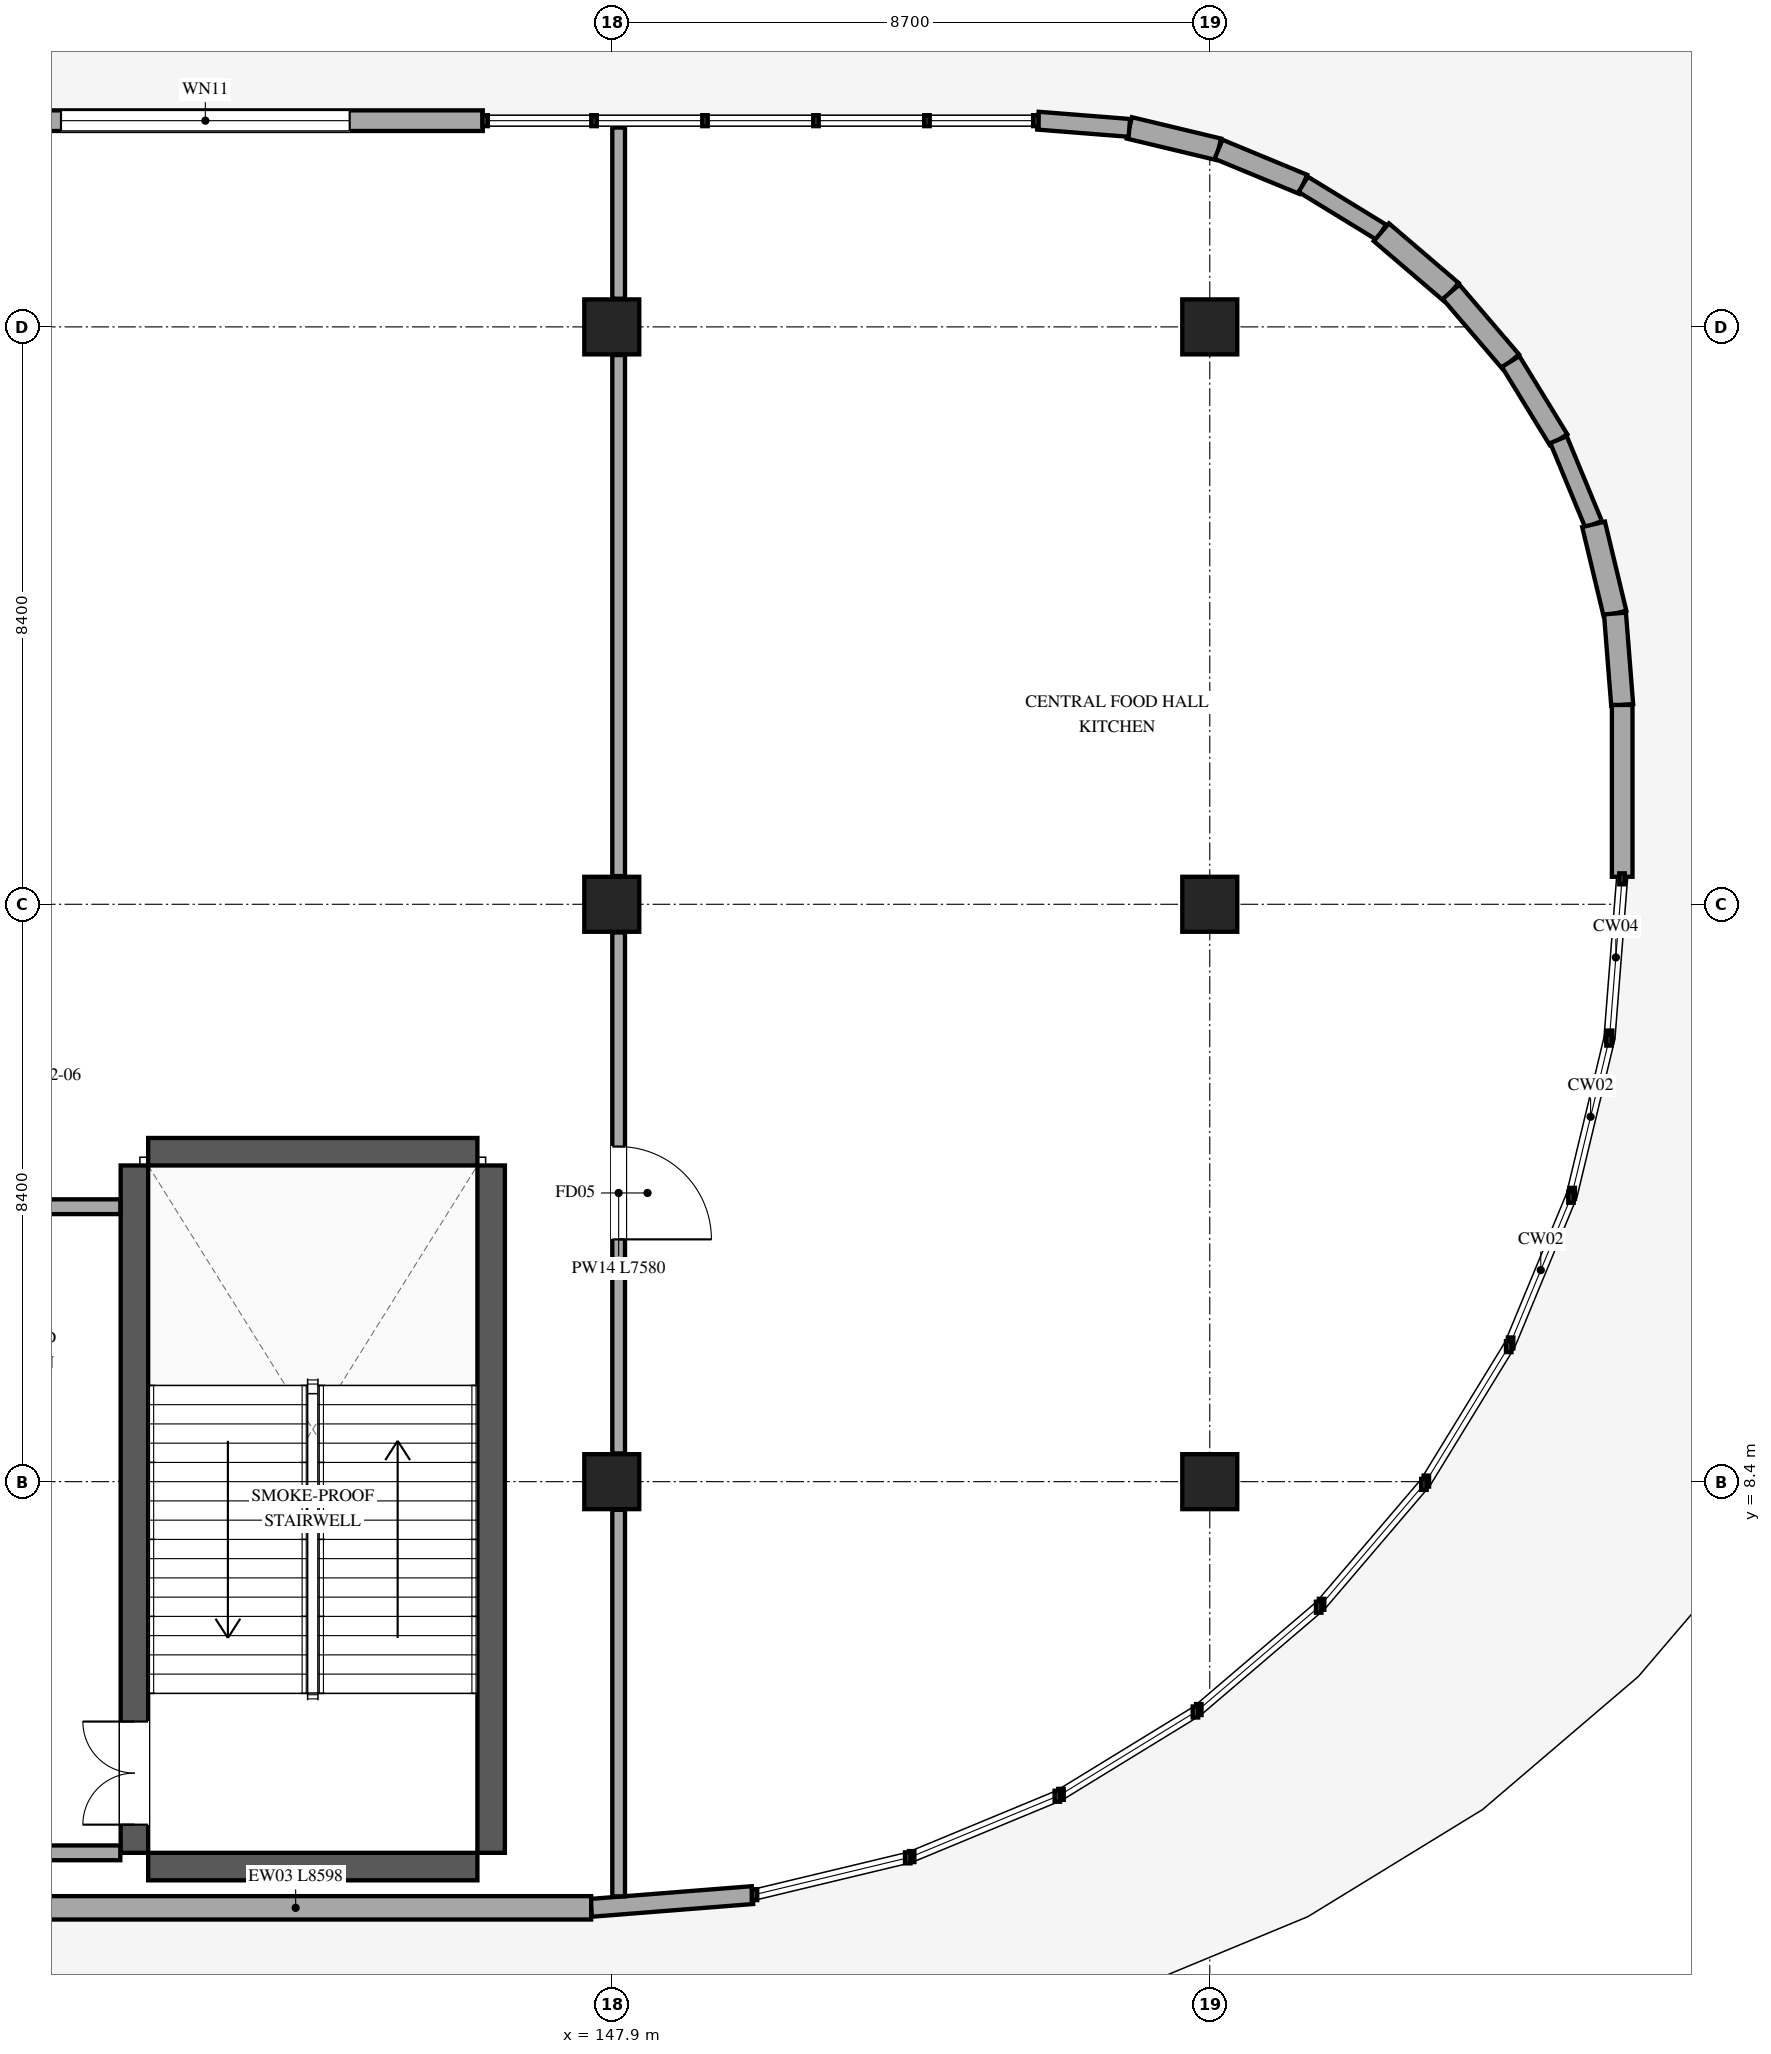
"""IFC4 building model, lengths in metres.
Left out: names, types, materials, properties, quantities, classifications, styles, units other than length and angle.
Written with IfcOpenShell. Run it as: python <this file> out.ifc"""

import sys

from ifc_helpers import new_model, si_unit, direction, frame, frame_2d, origin, origin_2d, place, context, subcontext, project, spatial, rectangle, extrude, element, fill, save


model = new_model("IFC4")
c1 = context("Model", 3, precision=1e-05, world=origin(), true_north=direction((0.0, 1.0)))
c2 = subcontext(c1, "Body", "Model", "MODEL_VIEW")
j1 = project(units=[si_unit("LENGTHUNIT", "METRE"), si_unit("PLANEANGLEUNIT", "RADIAN")], contexts=[c1])
p1 = place(None, origin())
s1 = spatial("IfcSite", under=j1, at=p1, CompositionType="ELEMENT")
p2 = place(p1, origin())
s2 = spatial("IfcBuilding", under=s1, at=p2, CompositionType="ELEMENT")
p3 = place(p2, frame((0.0, 0.0, 16.5)))
s3 = spatial("IfcBuildingStorey", under=s2, at=p3, CompositionType="ELEMENT", Elevation=16.5)
for number, where, z_axis, x_axis in (
    (1, (147.9, 8.4, 0.0), (0.0, 0.0, 1.0), (1.0, 0.0, 0.0)),
    (2, (147.9, 16.8, 0.0), (0.0, 0.0, 1.0), (1.0, 0.0, 0.0)),
    (3, (147.9, 25.2, 0.0), (0.0, 0.0, 1.0), (1.0, 0.0, 0.0)),
    (4, (156.6, 8.4, 0.0), (0.0, 0.0, 1.0), (1.0, 0.0, 0.0)),
    (5, (156.6, 16.8, 0.0), (0.0, 0.0, 1.0), (1.0, 0.0, 0.0)),
    (6, (156.6, 25.2, 0.0), (0.0, 0.0, 1.0), (1.0, 0.0, 0.0)),
):
    element("IfcColumn", number, at=place(p3, frame(where, z_axis=z_axis, x_axis=x_axis)), inside=s3, PredefinedType="COLUMN", context=c2, shape_type="SweptSolid", body=[
        extrude(rectangle(XDim=0.8, YDim=0.8, at=origin_2d()), origin(), (0.0, 0.0, 1.0), 5.1),
    ])
p4 = place(p3, frame((155.43, 28.095, 0.0), z_axis=(0.0, 0.0, 1.0), x_axis=(0.972433801414, -0.233179119707, 0.0)))
e7 = element("IfcWall", 7, at=p4, inside=s3, PredefinedType="STANDARD", context=c2, shape_type="SweptSolid", body=[
    extrude(rectangle(XDim=1.334, YDim=0.32, at=frame_2d((0.667, 0.0))), origin(), (0.0, 0.0, 1.0), 4.79),
])
p5 = place(p3, frame((156.727, 27.784, 0.0), z_axis=(0.0, 0.0, 1.0), x_axis=(0.923952127992, -0.382508124331, 0.0)))
e8 = element("IfcWall", 8, at=p5, inside=s3, PredefinedType="STANDARD", context=c2, shape_type="SweptSolid", body=[
    extrude(rectangle(XDim=1.333, YDim=0.3, at=frame_2d((0.667, 0.0))), origin(), (0.0, 0.0, 1.0), 4.79),
])
p6 = place(p3, frame((157.959, 27.274, 0.0), z_axis=(0.0, 0.0, 1.0), x_axis=(0.852543363643, -0.522656496285, 0.0)))
e9 = element("IfcWall", 9, at=p6, inside=s3, PredefinedType="STANDARD", context=c2, shape_type="SweptSolid", body=[
    extrude(rectangle(XDim=1.333, YDim=0.26, at=frame_2d((0.667, 0.0))), origin(), (0.0, 0.0, 1.0), 4.79),
])
p7 = place(p3, frame((159.096, 26.577, 0.0), z_axis=(0.0, 0.0, 1.0), x_axis=(0.760121344352, -0.649781149204, 0.0)))
e10 = element("IfcWall", 10, at=p7, inside=s3, PredefinedType="STANDARD", context=c2, shape_type="SweptSolid", body=[
    extrude(rectangle(XDim=1.334, YDim=0.34, at=frame_2d((0.667, 0.0))), origin(), (0.0, 0.0, 1.0), 4.79),
])
p8 = place(p3, frame((160.11, 25.71, 0.0), z_axis=(0.0, 0.0, 1.0), x_axis=(0.649871535961, -0.760044068951, 0.0)))
e11 = element("IfcWall", 11, at=p8, inside=s3, PredefinedType="STANDARD", context=c2, shape_type="SweptSolid", body=[
    extrude(rectangle(XDim=1.334, YDim=0.32, at=frame_2d((0.667, 0.0))), origin(), (0.0, 0.0, 1.0), 4.79),
])
p9 = place(p3, frame((160.977, 24.696, 0.0), z_axis=(0.0, 0.0, 1.0), x_axis=(0.522656496285, -0.852543363643, 0.0)))
e12 = element("IfcWall", 12, at=p9, inside=s3, PredefinedType="STANDARD", context=c2, shape_type="SweptSolid", body=[
    extrude(rectangle(XDim=1.333, YDim=0.3, at=frame_2d((0.667, 0.0))), origin(), (0.0, 0.0, 1.0), 4.79),
])
p10 = place(p3, frame((161.674, 23.559, 0.0), z_axis=(0.0, 0.0, 1.0), x_axis=(0.382443421217, -0.923978911863, 0.0)))
e13 = element("IfcWall", 13, at=p10, inside=s3, PredefinedType="STANDARD", context=c2, shape_type="SweptSolid", body=[
    extrude(rectangle(XDim=1.333, YDim=0.26, at=frame_2d((0.667, 0.0))), origin(), (0.0, 0.0, 1.0), 4.79),
])
p11 = place(p3, frame((162.184, 22.327, 0.0), z_axis=(0.0, 0.0, 1.0), x_axis=(0.233220628969, -0.972423847005, 0.0)))
e14 = element("IfcWall", 14, at=p11, inside=s3, PredefinedType="STANDARD", context=c2, shape_type="SweptSolid", body=[
    extrude(rectangle(XDim=1.334, YDim=0.34, at=frame_2d((0.667, 0.0))), origin(), (0.0, 0.0, 1.0), 4.79),
])
p12 = place(p3, frame((162.495, 21.03, 0.0), z_axis=(0.0, 0.0, 1.0), x_axis=(0.078683343185, -0.996899659698, 0.0)))
e15 = element("IfcWall", 15, at=p12, inside=s3, PredefinedType="STANDARD", context=c2, shape_type="SweptSolid", body=[
    extrude(rectangle(XDim=1.334, YDim=0.32, at=frame_2d((0.667, 0.0))), origin(), (0.0, 0.0, 1.0), 4.79),
])
p13 = place(p3, frame((162.6, 19.7, 0.0), z_axis=(0.0, 0.0, 1.0), x_axis=(0.0, -1.0, 0.0)))
e16 = element("IfcWall", 16, at=p13, inside=s3, PredefinedType="STANDARD", context=c2, shape_type="SweptSolid", body=[
    extrude(rectangle(XDim=2.5, YDim=0.3, at=frame_2d((1.25, 0.0))), origin(), (0.0, 0.0, 1.0), 4.79),
])
p14 = place(p3, frame((149.947, 2.385, 0.0), z_axis=(0.0, 0.0, 1.0), x_axis=(-0.996905638222, -0.078607559947, 0.0)))
e17 = element("IfcWall", 17, at=p14, inside=s3, PredefinedType="STANDARD", context=c2, shape_type="SweptSolid", body=[
    extrude(rectangle(XDim=2.354, YDim=0.26, at=frame_2d((1.177, 0.0))), origin(), (0.0, 0.0, 1.0), 4.79),
])
p15 = place(p3, frame((147.6, 2.2, 0.0), z_axis=(0.0, 0.0, 1.0), x_axis=(-1.0, 0.0, 0.0)))
e18 = element("IfcWall", 18, at=p15, inside=s3, PredefinedType="STANDARD", context=c2, shape_type="SweptSolid", body=[
    extrude(rectangle(XDim=8.598, YDim=0.34, at=frame_2d((4.299, 0.0))), origin(), (0.0, 0.0, 1.0), 4.79),
])
p16 = place(p3, frame((137.952, 28.2, 0.0), z_axis=(0.0, 0.0, 1.0), x_axis=(1.0, 0.0, 0.0)))
e19 = element("IfcWall", 19, at=p16, inside=s3, PredefinedType="STANDARD", context=c2, shape_type="SweptSolid", body=[
    extrude(rectangle(XDim=8.071, YDim=0.3, at=frame_2d((4.036, 0.0))), origin(), (0.0, 0.0, 1.0), 4.79),
])
p17 = place(p16, frame((1.935, 0.0, 0.85)))
e20 = element("IfcOpeningElement", 20, at=p17, cuts=e19, PredefinedType="OPENING", context=c2, shape_type="SweptSolid", body=[
    extrude(rectangle(XDim=4.2, YDim=2.4, at=frame_2d((2.1, 1.2))), frame((0.0, 0.16, 0.0), z_axis=(0.0, -1.0, 0.0), x_axis=(1.0, 0.0, 0.0)), (0.0, 0.0, 1.0), 0.32),
])
p18 = place(p3, frame((154.1, 28.2, 0.0), z_axis=(0.0, 0.0, 1.0), x_axis=(0.996898526518, -0.078697698991, 0.0)))
e21 = element("IfcWall", 21, at=p18, inside=s3, PredefinedType="STANDARD", context=c2, shape_type="SweptSolid", body=[
    extrude(rectangle(XDim=1.334, YDim=0.26, at=frame_2d((0.667, 0.0))), origin(), (0.0, 0.0, 1.0), 4.79),
])
p19 = place(p3, frame((140.955, 3.0, 0.0), z_axis=(0.0, 0.0, 1.0), x_axis=(0.0, 1.0, 0.0)))
e22 = element("IfcWall", 22, at=p19, inside=s3, PredefinedType="SHEAR", context=c2, shape_type="SweptSolid", body=[
    extrude(rectangle(XDim=10.0, YDim=0.4, at=frame_2d((5.0, 0.0))), origin(), (0.0, 0.0, 1.0), 5.1),
])
p20 = place(p19, frame((0.41, 0.0, 0.0)))
e23 = element("IfcOpeningElement", 23, at=p20, cuts=e22, PredefinedType="OPENING", context=c2, shape_type="SweptSolid", body=[
    extrude(rectangle(XDim=1.5, YDim=2.2, at=frame_2d((0.75, 1.1))), frame((0.0, 0.21, 0.0), z_axis=(0.0, -1.0, 0.0), x_axis=(1.0, 0.0, 0.0)), (0.0, 0.0, 1.0), 0.42),
])
p21 = place(p3, frame((146.145, 13.0, 0.0), z_axis=(0.0, 0.0, 1.0), x_axis=(0.0, -1.0, 0.0)))
e24 = element("IfcWall", 24, at=p21, inside=s3, PredefinedType="SHEAR", context=c2, shape_type="SweptSolid", body=[
    extrude(rectangle(XDim=10.0, YDim=0.4, at=frame_2d((5.0, 0.0))), origin(), (0.0, 0.0, 1.0), 5.1),
])
for number, where, z_axis, x_axis in (
    (25, (145.945, 2.8, 0.0), (0.0, 0.0, 1.0), (-1.0, 0.0, 0.0)),
    (26, (141.155, 13.2, 0.0), (0.0, 0.0, 1.0), (1.0, 0.0, 0.0)),
):
    element("IfcWall", number, at=place(p3, frame(where, z_axis=z_axis, x_axis=x_axis)), inside=s3, PredefinedType="SHEAR", context=c2, shape_type="SweptSolid", body=[
        extrude(rectangle(XDim=4.79, YDim=0.4, at=frame_2d((2.395, 0.0))), origin(), (0.0, 0.0, 1.0), 5.1),
    ])
p22 = place(p3, frame((121.9, 12.4, 0.0), z_axis=(0.0, 0.0, 1.0), x_axis=(1.0, 0.0, 0.0)))
e27 = element("IfcWall", 27, at=p22, inside=s3, PredefinedType="PARTITIONING", context=c2, shape_type="SweptSolid", body=[
    extrude(rectangle(XDim=18.85, YDim=0.215, at=frame_2d((9.425, 0.0))), origin(), (0.0, 0.0, 1.0), 4.045),
])
p23 = place(p22, frame((8.75, 0.0, 0.0)))
e28 = element("IfcOpeningElement", 28, at=p23, cuts=e27, PredefinedType="OPENING", context=c2, shape_type="SweptSolid", body=[
    extrude(rectangle(XDim=1.35, YDim=2.2, at=frame_2d((0.675, 1.1))), frame((0.0, 0.118, 0.0), z_axis=(0.0, -1.0, 0.0), x_axis=(1.0, 0.0, 0.0)), (0.0, 0.0, 1.0), 0.235),
])
p24 = place(p3, frame((140.75, 3.0, 0.0), z_axis=(0.0, 0.0, 1.0), x_axis=(-1.0, 0.0, 0.0)))
e29 = element("IfcWall", 29, at=p24, inside=s3, PredefinedType="PARTITIONING", context=c2, shape_type="SweptSolid", body=[
    extrude(rectangle(XDim=4.35, YDim=0.215, at=frame_2d((2.175, 0.0))), origin(), (0.0, 0.0, 1.0), 4.76),
])
p25 = place(p3, frame((148.0, 28.1, 0.0), z_axis=(0.0, 0.0, 1.0), x_axis=(0.0, -1.0, 0.0)))
e30 = element("IfcWall", 30, at=p25, inside=s3, PredefinedType="PARTITIONING", context=c2, shape_type="SweptSolid", body=[
    extrude(rectangle(XDim=2.49, YDim=0.185, at=frame_2d((1.245, 0.0))), origin(), (0.0, 0.0, 1.0), 4.76),
])
p26 = place(p3, frame((148.0, 24.79, 0.0), z_axis=(0.0, 0.0, 1.0), x_axis=(0.0, -1.0, 0.0)))
e31 = element("IfcWall", 31, at=p26, inside=s3, PredefinedType="PARTITIONING", context=c2, shape_type="SweptSolid", body=[
    extrude(rectangle(XDim=7.58, YDim=0.185, at=frame_2d((3.79, 0.0))), origin(), (0.0, 0.0, 1.0), 4.045),
])
p27 = place(p3, frame((148.0, 16.39, 0.0), z_axis=(0.0, 0.0, 1.0), x_axis=(0.0, -1.0, 0.0)))
e32 = element("IfcWall", 32, at=p27, inside=s3, PredefinedType="PARTITIONING", context=c2, shape_type="SweptSolid", body=[
    extrude(rectangle(XDim=7.58, YDim=0.185, at=frame_2d((3.79, 0.0))), origin(), (0.0, 0.0, 1.0), 4.045),
])
p28 = place(p27, frame((3.115, 0.0, 0.0)))
e33 = element("IfcOpeningElement", 33, at=p28, cuts=e32, PredefinedType="OPENING", context=c2, shape_type="SweptSolid", body=[
    extrude(rectangle(XDim=1.35, YDim=2.2, at=frame_2d((0.675, 1.1))), frame((0.0, 0.103, 0.0), z_axis=(0.0, -1.0, 0.0), x_axis=(1.0, 0.0, 0.0)), (0.0, 0.0, 1.0), 0.205),
])
p29 = place(p3, frame((148.0, 7.99, 0.0), z_axis=(0.0, 0.0, 1.0), x_axis=(0.0, -1.0, 0.0)))
e34 = element("IfcWall", 34, at=p29, inside=s3, PredefinedType="PARTITIONING", context=c2, shape_type="SweptSolid", body=[
    extrude(rectangle(XDim=5.623, YDim=0.185, at=frame_2d((2.812, 0.0))), origin(), (0.0, 0.0, 1.0), 4.76),
])
p30 = place(p17, origin())
e35 = element("IfcWindow", 35, at=p30, inside=s3, PartitioningType="TRIPLE_PANEL_VERTICAL", PredefinedType="WINDOW", context=c2, shape_type="SweptSolid", body=[
    extrude(rectangle(XDim=4.2, YDim=2.4, at=frame_2d((2.1, 1.2))), frame((0.0, 0.03, 0.0), z_axis=(0.0, -1.0, 0.0), x_axis=(1.0, 0.0, 0.0)), (0.0, 0.0, 1.0), 0.06),
])
fill(e20, e35)
p31 = place(p20, origin())
e36 = element("IfcDoor", 36, at=p31, inside=s3, OperationType="DOUBLE_DOOR_SINGLE_SWING", PredefinedType="DOOR", context=c2, shape_type="SweptSolid", body=[
    extrude(rectangle(XDim=1.5, YDim=2.2, at=frame_2d((0.75, 1.1))), frame((0.0, 0.025, 0.0), z_axis=(0.0, -1.0, 0.0), x_axis=(1.0, 0.0, 0.0)), (0.0, 0.0, 1.0), 0.05),
])
fill(e23, e36)
p32 = place(p28, origin())
e37 = element("IfcDoor", 37, at=p32, inside=s3, OperationType="SINGLE_SWING_RIGHT", PredefinedType="DOOR", context=c2, shape_type="SweptSolid", body=[
    extrude(rectangle(XDim=1.35, YDim=2.2, at=frame_2d((0.675, 1.1))), frame((0.0, 0.025, 0.0), z_axis=(0.0, -1.0, 0.0), x_axis=(1.0, 0.0, 0.0)), (0.0, 0.0, 1.0), 0.05),
])
fill(e33, e37)
save(model, sys.argv[1])
